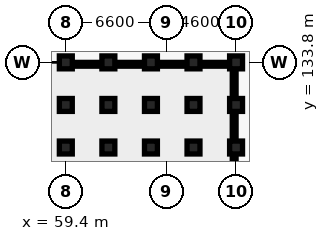
"""IFC4 building model, lengths in metres.
Left out: names, types, materials, properties, quantities, classifications, styles, units other than length and angle.
Written with IfcOpenShell. Run it as: python <this file> out.ifc"""

import sys

from ifc_helpers import new_model, si_unit, direction, frame, frame_2d, origin, origin_2d, place, context, subcontext, project, spatial, rectangle, extrude, element, fill, save


model = new_model("IFC4")
c1 = context("Model", 3, precision=1e-05, world=origin(), true_north=direction((0.0, 1.0)))
c2 = subcontext(c1, "Body", "Model", "MODEL_VIEW")
j1 = project(units=[si_unit("LENGTHUNIT", "METRE"), si_unit("PLANEANGLEUNIT", "RADIAN")], contexts=[c1])
p1 = place(None, origin())
s1 = spatial("IfcSite", under=j1, at=p1, CompositionType="ELEMENT")
p2 = place(p1, origin())
s2 = spatial("IfcBuilding", under=s1, at=p2, CompositionType="ELEMENT")
p3 = place(p2, origin())
s3 = spatial("IfcBuildingStorey", under=s2, at=p3, CompositionType="ELEMENT", Elevation=0.0)
for number, where, z_axis, x_axis in (
    (1, (59.4, 128.2, 0.0), (0.0, 0.0, 1.0), (1.0, 0.0, 0.0)),
    (2, (59.4, 131.0, 0.0), (0.0, 0.0, 1.0), (1.0, 0.0, 0.0)),
    (3, (59.4, 133.8, 0.0), (0.0, 0.0, 1.0), (1.0, 0.0, 0.0)),
    (4, (62.2, 128.2, 0.0), (0.0, 0.0, 1.0), (1.0, 0.0, 0.0)),
    (5, (62.2, 131.0, 0.0), (0.0, 0.0, 1.0), (1.0, 0.0, 0.0)),
    (6, (62.2, 133.8, 0.0), (0.0, 0.0, 1.0), (1.0, 0.0, 0.0)),
    (7, (65.0, 128.2, 0.0), (0.0, 0.0, 1.0), (1.0, 0.0, 0.0)),
    (8, (65.0, 131.0, 0.0), (0.0, 0.0, 1.0), (1.0, 0.0, 0.0)),
    (9, (65.0, 133.8, 0.0), (0.0, 0.0, 1.0), (1.0, 0.0, 0.0)),
    (10, (67.8, 128.2, 0.0), (0.0, 0.0, 1.0), (1.0, 0.0, 0.0)),
    (11, (67.8, 131.0, 0.0), (0.0, 0.0, 1.0), (1.0, 0.0, 0.0)),
    (12, (67.8, 133.8, 0.0), (0.0, 0.0, 1.0), (1.0, 0.0, 0.0)),
    (13, (70.6, 128.2, 0.0), (0.0, 0.0, 1.0), (1.0, 0.0, 0.0)),
    (14, (70.6, 131.0, 0.0), (0.0, 0.0, 1.0), (1.0, 0.0, 0.0)),
    (15, (70.6, 133.8, 0.0), (0.0, 0.0, 1.0), (1.0, 0.0, 0.0)),
):
    element("IfcColumn", number, at=place(p3, frame(where, z_axis=z_axis, x_axis=x_axis)), inside=s3, PredefinedType="COLUMN", context=c2, shape_type="SweptSolid", body=[
        extrude(rectangle(XDim=0.85, YDim=0.85, at=origin_2d()), origin(), (0.0, 0.0, 1.0), 4.15),
    ])
p4 = place(p3, frame((59.48, 128.2, 0.0), z_axis=(0.0, 0.0, 1.0), x_axis=(1.0, 0.0, 0.0)))
e16 = element("IfcWall", 16, at=p4, inside=s3, PredefinedType="PLUMBINGWALL", context=c2, shape_type="SweptSolid", body=[
    extrude(rectangle(XDim=2.64, YDim=0.16, at=frame_2d((1.32, 0.0))), origin(), (0.0, 0.0, 1.0), 3.492),
])
p5 = place(p4, frame((0.87, 0.0, 0.0)))
e17 = element("IfcOpeningElement", 17, at=p5, cuts=e16, PredefinedType="OPENING", context=c2, shape_type="SweptSolid", body=[
    extrude(rectangle(XDim=0.9, YDim=2.1, at=frame_2d((0.45, 1.05))), frame((0.0, 0.09, 0.0), z_axis=(0.0, -1.0, 0.0), x_axis=(1.0, 0.0, 0.0)), (0.0, 0.0, 1.0), 0.18),
])
p6 = place(p3, frame((62.28, 128.2, 0.0), z_axis=(0.0, 0.0, 1.0), x_axis=(1.0, 0.0, 0.0)))
e18 = element("IfcWall", 18, at=p6, inside=s3, PredefinedType="PLUMBINGWALL", context=c2, shape_type="SweptSolid", body=[
    extrude(rectangle(XDim=2.64, YDim=0.16, at=frame_2d((1.32, 0.0))), origin(), (0.0, 0.0, 1.0), 3.492),
])
p7 = place(p6, frame((0.92, 0.0, 0.0)))
e19 = element("IfcOpeningElement", 19, at=p7, cuts=e18, PredefinedType="OPENING", context=c2, shape_type="SweptSolid", body=[
    extrude(rectangle(XDim=0.8, YDim=2.1, at=frame_2d((0.4, 1.05))), frame((0.0, 0.09, 0.0), z_axis=(0.0, -1.0, 0.0), x_axis=(1.0, 0.0, 0.0)), (0.0, 0.0, 1.0), 0.18),
])
p8 = place(p3, frame((65.08, 128.2, 0.0), z_axis=(0.0, 0.0, 1.0), x_axis=(1.0, 0.0, 0.0)))
e20 = element("IfcWall", 20, at=p8, inside=s3, PredefinedType="PLUMBINGWALL", context=c2, shape_type="SweptSolid", body=[
    extrude(rectangle(XDim=2.64, YDim=0.16, at=frame_2d((1.32, 0.0))), origin(), (0.0, 0.0, 1.0), 3.492),
])
p9 = place(p8, frame((0.87, 0.0, 0.0)))
e21 = element("IfcOpeningElement", 21, at=p9, cuts=e20, PredefinedType="OPENING", context=c2, shape_type="SweptSolid", body=[
    extrude(rectangle(XDim=0.9, YDim=2.1, at=frame_2d((0.45, 1.05))), frame((0.0, 0.09, 0.0), z_axis=(0.0, -1.0, 0.0), x_axis=(1.0, 0.0, 0.0)), (0.0, 0.0, 1.0), 0.18),
])
p10 = place(p3, frame((67.88, 128.2, 0.0), z_axis=(0.0, 0.0, 1.0), x_axis=(1.0, 0.0, 0.0)))
e22 = element("IfcWall", 22, at=p10, inside=s3, PredefinedType="PLUMBINGWALL", context=c2, shape_type="SweptSolid", body=[
    extrude(rectangle(XDim=2.64, YDim=0.16, at=frame_2d((1.32, 0.0))), origin(), (0.0, 0.0, 1.0), 3.492),
])
p11 = place(p10, frame((0.92, 0.0, 0.0)))
e23 = element("IfcOpeningElement", 23, at=p11, cuts=e22, PredefinedType="OPENING", context=c2, shape_type="SweptSolid", body=[
    extrude(rectangle(XDim=0.8, YDim=2.1, at=frame_2d((0.4, 1.05))), frame((0.0, 0.09, 0.0), z_axis=(0.0, -1.0, 0.0), x_axis=(1.0, 0.0, 0.0)), (0.0, 0.0, 1.0), 0.18),
])
p12 = place(p3, frame((59.4, 122.7, 0.0), z_axis=(0.0, 0.0, 1.0), x_axis=(0.0, 1.0, 0.0)))
e24 = element("IfcWall", 24, at=p12, inside=s3, PredefinedType="PARTITIONING", context=c2, shape_type="SweptSolid", body=[
    extrude(rectangle(XDim=10.82, YDim=0.15, at=frame_2d((5.41, 0.0))), origin(), (0.0, 0.0, 1.0), 3.492),
])
p13 = place(p12, frame((0.899, 0.0, 0.0)))
e25 = element("IfcOpeningElement", 25, at=p13, cuts=e24, PredefinedType="OPENING", context=c2, shape_type="SweptSolid", body=[
    extrude(rectangle(XDim=0.8, YDim=2.1, at=frame_2d((0.4, 1.05))), frame((0.0, 0.085, 0.0), z_axis=(0.0, -1.0, 0.0), x_axis=(1.0, 0.0, 0.0)), (0.0, 0.0, 1.0), 0.17),
])
p14 = place(p3, frame((62.2, 122.7, 0.0), z_axis=(0.0, 0.0, 1.0), x_axis=(0.0, 1.0, 0.0)))
e26 = element("IfcWall", 26, at=p14, inside=s3, PredefinedType="PARTITIONING", context=c2, shape_type="SweptSolid", body=[
    extrude(rectangle(XDim=10.82, YDim=0.15, at=frame_2d((5.41, 0.0))), origin(), (0.0, 0.0, 1.0), 3.492),
])
p15 = place(p14, frame((0.899, 0.0, 0.0)))
e27 = element("IfcOpeningElement", 27, at=p15, cuts=e26, PredefinedType="OPENING", context=c2, shape_type="SweptSolid", body=[
    extrude(rectangle(XDim=0.8, YDim=2.1, at=frame_2d((0.4, 1.05))), frame((0.0, 0.085, 0.0), z_axis=(0.0, -1.0, 0.0), x_axis=(1.0, 0.0, 0.0)), (0.0, 0.0, 1.0), 0.17),
])
p16 = place(p3, frame((65.0, 122.7, 0.0), z_axis=(0.0, 0.0, 1.0), x_axis=(0.0, 1.0, 0.0)))
e28 = element("IfcWall", 28, at=p16, inside=s3, PredefinedType="STANDARD", context=c2, shape_type="SweptSolid", body=[
    extrude(rectangle(XDim=10.82, YDim=0.22, at=frame_2d((5.41, 0.0))), origin(), (0.0, 0.0, 1.0), 3.492),
])
p17 = place(p3, frame((67.8, 122.7, 0.0), z_axis=(0.0, 0.0, 1.0), x_axis=(0.0, 1.0, 0.0)))
e29 = element("IfcWall", 29, at=p17, inside=s3, PredefinedType="PARTITIONING", context=c2, shape_type="SweptSolid", body=[
    extrude(rectangle(XDim=10.82, YDim=0.15, at=frame_2d((5.41, 0.0))), origin(), (0.0, 0.0, 1.0), 3.492),
])
p18 = place(p17, frame((0.899, 0.0, 0.0)))
e30 = element("IfcOpeningElement", 30, at=p18, cuts=e29, PredefinedType="OPENING", context=c2, shape_type="SweptSolid", body=[
    extrude(rectangle(XDim=0.8, YDim=2.1, at=frame_2d((0.4, 1.05))), frame((0.0, 0.085, 0.0), z_axis=(0.0, -1.0, 0.0), x_axis=(1.0, 0.0, 0.0)), (0.0, 0.0, 1.0), 0.17),
])
p19 = place(p3, frame((59.829, 133.675, 0.0), z_axis=(0.0, 0.0, 1.0), x_axis=(1.0, 0.0, 0.0)))
e31 = element("IfcWall", 31, at=p19, inside=s3, PredefinedType="STANDARD", context=c2, shape_type="SweptSolid", body=[
    extrude(rectangle(XDim=1.943, YDim=0.25, at=frame_2d((0.971, 0.0))), origin(), (0.0, 0.0, 1.0), 3.692),
])
p20 = place(p19, frame((0.497, 0.0, 0.88)))
e32 = element("IfcOpeningElement", 32, at=p20, cuts=e31, PredefinedType="OPENING", context=c2, shape_type="SweptSolid", body=[
    extrude(rectangle(XDim=0.95, YDim=1.35, at=frame_2d((0.475, 0.675))), frame((0.0, 0.135, 0.0), z_axis=(0.0, -1.0, 0.0), x_axis=(1.0, 0.0, 0.0)), (0.0, 0.0, 1.0), 0.27),
])
p21 = place(p3, frame((62.628, 133.675, 0.0), z_axis=(0.0, 0.0, 1.0), x_axis=(1.0, 0.0, 0.0)))
e33 = element("IfcWall", 33, at=p21, inside=s3, PredefinedType="STANDARD", context=c2, shape_type="SweptSolid", body=[
    extrude(rectangle(XDim=1.943, YDim=0.25, at=frame_2d((0.972, 0.0))), origin(), (0.0, 0.0, 1.0), 3.692),
])
p22 = place(p21, frame((0.372, 0.0, 0.88)))
e34 = element("IfcOpeningElement", 34, at=p22, cuts=e33, PredefinedType="OPENING", context=c2, shape_type="SweptSolid", body=[
    extrude(rectangle(XDim=1.2, YDim=1.5, at=frame_2d((0.6, 0.75))), frame((0.0, 0.135, 0.0), z_axis=(0.0, -1.0, 0.0), x_axis=(1.0, 0.0, 0.0)), (0.0, 0.0, 1.0), 0.27),
])
p23 = place(p3, frame((65.428, 133.675, 0.0), z_axis=(0.0, 0.0, 1.0), x_axis=(1.0, 0.0, 0.0)))
e35 = element("IfcWall", 35, at=p23, inside=s3, PredefinedType="STANDARD", context=c2, shape_type="SweptSolid", body=[
    extrude(rectangle(XDim=1.943, YDim=0.25, at=frame_2d((0.972, 0.0))), origin(), (0.0, 0.0, 1.0), 3.692),
])
p24 = place(p23, frame((0.372, 0.0, 0.88)))
e36 = element("IfcOpeningElement", 36, at=p24, cuts=e35, PredefinedType="OPENING", context=c2, shape_type="SweptSolid", body=[
    extrude(rectangle(XDim=1.2, YDim=1.5, at=frame_2d((0.6, 0.75))), frame((0.0, 0.135, 0.0), z_axis=(0.0, -1.0, 0.0), x_axis=(1.0, 0.0, 0.0)), (0.0, 0.0, 1.0), 0.27),
])
p25 = place(p3, frame((68.229, 133.675, 0.0), z_axis=(0.0, 0.0, 1.0), x_axis=(1.0, 0.0, 0.0)))
e37 = element("IfcWall", 37, at=p25, inside=s3, PredefinedType="STANDARD", context=c2, shape_type="SweptSolid", body=[
    extrude(rectangle(XDim=1.943, YDim=0.25, at=frame_2d((0.971, 0.0))), origin(), (0.0, 0.0, 1.0), 3.692),
])
p26 = place(p25, frame((0.421, 0.0, 0.88)))
e38 = element("IfcOpeningElement", 38, at=p26, cuts=e37, PredefinedType="OPENING", context=c2, shape_type="SweptSolid", body=[
    extrude(rectangle(XDim=1.1, YDim=1.45, at=frame_2d((0.55, 0.725))), frame((0.0, 0.135, 0.0), z_axis=(0.0, -1.0, 0.0), x_axis=(1.0, 0.0, 0.0)), (0.0, 0.0, 1.0), 0.27),
])
p27 = place(p3, frame((70.475, 125.82, 0.0), z_axis=(0.0, 0.0, 1.0), x_axis=(0.0, 1.0, 0.0)))
e39 = element("IfcWall", 39, at=p27, inside=s3, PredefinedType="STANDARD", context=c2, shape_type="SweptSolid", body=[
    extrude(rectangle(XDim=1.96, YDim=0.25, at=frame_2d((0.98, 0.0))), origin(), (0.0, 0.0, 1.0), 3.492),
])
p28 = place(p27, frame((0.38, 0.0, 0.88)))
e40 = element("IfcOpeningElement", 40, at=p28, cuts=e39, PredefinedType="OPENING", context=c2, shape_type="SweptSolid", body=[
    extrude(rectangle(XDim=1.2, YDim=1.5, at=frame_2d((0.6, 0.75))), frame((0.0, 0.135, 0.0), z_axis=(0.0, -1.0, 0.0), x_axis=(1.0, 0.0, 0.0)), (0.0, 0.0, 1.0), 0.27),
])
p29 = place(p3, frame((70.475, 128.62, 0.0), z_axis=(0.0, 0.0, 1.0), x_axis=(0.0, 1.0, 0.0)))
e41 = element("IfcWall", 41, at=p29, inside=s3, PredefinedType="STANDARD", context=c2, shape_type="SweptSolid", body=[
    extrude(rectangle(XDim=1.96, YDim=0.25, at=frame_2d((0.98, 0.0))), origin(), (0.0, 0.0, 1.0), 3.492),
])
p30 = place(p29, frame((0.38, 0.0, 0.88)))
e42 = element("IfcOpeningElement", 42, at=p30, cuts=e41, PredefinedType="OPENING", context=c2, shape_type="SweptSolid", body=[
    extrude(rectangle(XDim=1.2, YDim=1.5, at=frame_2d((0.6, 0.75))), frame((0.0, 0.135, 0.0), z_axis=(0.0, -1.0, 0.0), x_axis=(1.0, 0.0, 0.0)), (0.0, 0.0, 1.0), 0.27),
])
p31 = place(p3, frame((70.475, 131.42, 0.0), z_axis=(0.0, 0.0, 1.0), x_axis=(0.0, 1.0, 0.0)))
e43 = element("IfcWall", 43, at=p31, inside=s3, PredefinedType="STANDARD", context=c2, shape_type="SweptSolid", body=[
    extrude(rectangle(XDim=1.96, YDim=0.25, at=frame_2d((0.98, 0.0))), origin(), (0.0, 0.0, 1.0), 3.492),
])
p32 = place(p31, frame((0.38, 0.0, 0.88)))
e44 = element("IfcOpeningElement", 44, at=p32, cuts=e43, PredefinedType="OPENING", context=c2, shape_type="SweptSolid", body=[
    extrude(rectangle(XDim=1.2, YDim=1.5, at=frame_2d((0.6, 0.75))), frame((0.0, 0.135, 0.0), z_axis=(0.0, -1.0, 0.0), x_axis=(1.0, 0.0, 0.0)), (0.0, 0.0, 1.0), 0.27),
])
p33 = place(p20, origin())
e45 = element("IfcWindow", 45, at=p33, inside=s3, PartitioningType="SINGLE_PANEL", PredefinedType="WINDOW", context=c2, shape_type="SweptSolid", body=[
    extrude(rectangle(XDim=0.95, YDim=1.35, at=frame_2d((0.475, 0.675))), frame((0.0, 0.03, 0.0), z_axis=(0.0, -1.0, 0.0), x_axis=(1.0, 0.0, 0.0)), (0.0, 0.0, 1.0), 0.06),
])
fill(e32, e45)
p34 = place(p22, origin())
e46 = element("IfcWindow", 46, at=p34, inside=s3, PartitioningType="SINGLE_PANEL", PredefinedType="WINDOW", context=c2, shape_type="SweptSolid", body=[
    extrude(rectangle(XDim=1.2, YDim=1.5, at=frame_2d((0.6, 0.75))), frame((0.0, 0.03, 0.0), z_axis=(0.0, -1.0, 0.0), x_axis=(1.0, 0.0, 0.0)), (0.0, 0.0, 1.0), 0.06),
])
fill(e34, e46)
p35 = place(p24, origin())
e47 = element("IfcWindow", 47, at=p35, inside=s3, PartitioningType="SINGLE_PANEL", PredefinedType="WINDOW", context=c2, shape_type="SweptSolid", body=[
    extrude(rectangle(XDim=1.2, YDim=1.5, at=frame_2d((0.6, 0.75))), frame((0.0, 0.03, 0.0), z_axis=(0.0, -1.0, 0.0), x_axis=(1.0, 0.0, 0.0)), (0.0, 0.0, 1.0), 0.06),
])
fill(e36, e47)
p36 = place(p26, origin())
e48 = element("IfcWindow", 48, at=p36, inside=s3, PartitioningType="SINGLE_PANEL", PredefinedType="WINDOW", context=c2, shape_type="SweptSolid", body=[
    extrude(rectangle(XDim=1.1, YDim=1.45, at=frame_2d((0.55, 0.725))), frame((0.0, 0.03, 0.0), z_axis=(0.0, -1.0, 0.0), x_axis=(1.0, 0.0, 0.0)), (0.0, 0.0, 1.0), 0.06),
])
fill(e38, e48)
p37 = place(p28, origin())
e49 = element("IfcWindow", 49, at=p37, inside=s3, PartitioningType="SINGLE_PANEL", PredefinedType="WINDOW", context=c2, shape_type="SweptSolid", body=[
    extrude(rectangle(XDim=1.2, YDim=1.5, at=frame_2d((0.6, 0.75))), frame((0.0, 0.03, 0.0), z_axis=(0.0, -1.0, 0.0), x_axis=(1.0, 0.0, 0.0)), (0.0, 0.0, 1.0), 0.06),
])
fill(e40, e49)
p38 = place(p30, origin())
e50 = element("IfcWindow", 50, at=p38, inside=s3, PartitioningType="SINGLE_PANEL", PredefinedType="WINDOW", context=c2, shape_type="SweptSolid", body=[
    extrude(rectangle(XDim=1.2, YDim=1.5, at=frame_2d((0.6, 0.75))), frame((0.0, 0.03, 0.0), z_axis=(0.0, -1.0, 0.0), x_axis=(1.0, 0.0, 0.0)), (0.0, 0.0, 1.0), 0.06),
])
fill(e42, e50)
p39 = place(p32, origin())
e51 = element("IfcWindow", 51, at=p39, inside=s3, PartitioningType="SINGLE_PANEL", PredefinedType="WINDOW", context=c2, shape_type="SweptSolid", body=[
    extrude(rectangle(XDim=1.2, YDim=1.5, at=frame_2d((0.6, 0.75))), frame((0.0, 0.03, 0.0), z_axis=(0.0, -1.0, 0.0), x_axis=(1.0, 0.0, 0.0)), (0.0, 0.0, 1.0), 0.06),
])
fill(e44, e51)
p40 = place(p5, frame((0.9, 0.0, 0.0), z_axis=(0.0, 0.0, 1.0), x_axis=(-1.0, 0.0, 0.0)))
e52 = element("IfcDoor", 52, at=p40, inside=s3, OperationType="SINGLE_SWING_RIGHT", PredefinedType="DOOR", context=c2, shape_type="SweptSolid", body=[
    extrude(rectangle(XDim=0.9, YDim=2.1, at=frame_2d((0.45, 1.05))), frame((0.0, 0.025, 0.0), z_axis=(0.0, -1.0, 0.0), x_axis=(1.0, 0.0, 0.0)), (0.0, 0.0, 1.0), 0.05),
])
fill(e17, e52)
p41 = place(p7, frame((0.8, 0.0, 0.0), z_axis=(0.0, 0.0, 1.0), x_axis=(-1.0, 0.0, 0.0)))
e53 = element("IfcDoor", 53, at=p41, inside=s3, OperationType="SINGLE_SWING_RIGHT", PredefinedType="DOOR", context=c2, shape_type="SweptSolid", body=[
    extrude(rectangle(XDim=0.8, YDim=2.1, at=frame_2d((0.4, 1.05))), frame((0.0, 0.025, 0.0), z_axis=(0.0, -1.0, 0.0), x_axis=(1.0, 0.0, 0.0)), (0.0, 0.0, 1.0), 0.05),
])
fill(e19, e53)
p42 = place(p9, frame((0.9, 0.0, 0.0), z_axis=(0.0, 0.0, 1.0), x_axis=(-1.0, 0.0, 0.0)))
e54 = element("IfcDoor", 54, at=p42, inside=s3, OperationType="SINGLE_SWING_RIGHT", PredefinedType="DOOR", context=c2, shape_type="SweptSolid", body=[
    extrude(rectangle(XDim=0.9, YDim=2.1, at=frame_2d((0.45, 1.05))), frame((0.0, 0.025, 0.0), z_axis=(0.0, -1.0, 0.0), x_axis=(1.0, 0.0, 0.0)), (0.0, 0.0, 1.0), 0.05),
])
fill(e21, e54)
p43 = place(p11, frame((0.8, 0.0, 0.0), z_axis=(0.0, 0.0, 1.0), x_axis=(-1.0, 0.0, 0.0)))
e55 = element("IfcDoor", 55, at=p43, inside=s3, OperationType="SINGLE_SWING_RIGHT", PredefinedType="DOOR", context=c2, shape_type="SweptSolid", body=[
    extrude(rectangle(XDim=0.8, YDim=2.1, at=frame_2d((0.4, 1.05))), frame((0.0, 0.025, 0.0), z_axis=(0.0, -1.0, 0.0), x_axis=(1.0, 0.0, 0.0)), (0.0, 0.0, 1.0), 0.05),
])
fill(e23, e55)
save(model, sys.argv[1])
